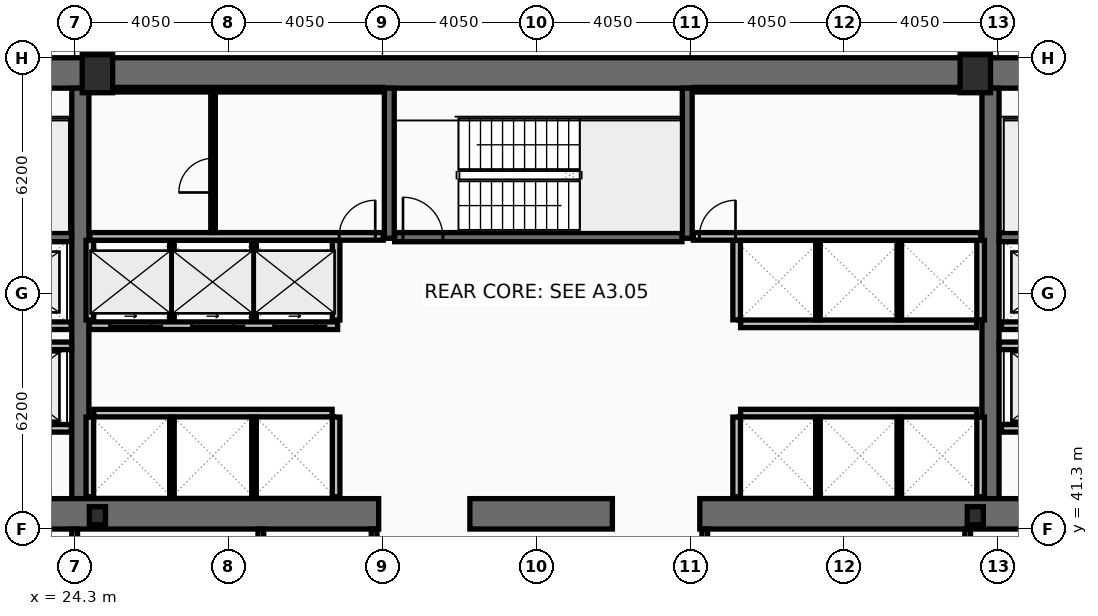
"""IFC4 building model, lengths in metres.
Left out: names, types, materials, properties, quantities, classifications, styles, units other than length and angle.
Written with IfcOpenShell. Run it as: python <this file> out.ifc"""

import sys

from ifc_helpers import new_model, si_unit, direction, frame, frame_2d, origin, origin_2d, place, context, subcontext, project, spatial, rectangle, hollow_rectangle, i_section, extrude, element, fill, save


model = new_model("IFC4")
c1 = context("Model", 3, precision=1e-05, world=origin(), true_north=direction((0.0, 1.0)))
c2 = subcontext(c1, "Body", "Model", "MODEL_VIEW")
j1 = project(units=[si_unit("LENGTHUNIT", "METRE"), si_unit("PLANEANGLEUNIT", "RADIAN")], contexts=[c1])
p1 = place(None, origin())
s1 = spatial("IfcSite", under=j1, at=p1, CompositionType="ELEMENT")
p2 = place(p1, origin())
s2 = spatial("IfcBuilding", under=s1, at=p2, CompositionType="ELEMENT")
p3 = place(p2, frame((0.0, 0.0, 65.8)))
s3 = spatial("IfcBuildingStorey", under=s2, at=p3, CompositionType="ELEMENT", Elevation=65.8)
p4 = place(p3, frame((16.2, 53.3, 0.0), z_axis=(0.0, 0.0, 1.0), x_axis=(1.0, 0.0, 0.0)))
e1 = element("IfcWall", 1, at=p4, inside=s3, PredefinedType="SHEAR", context=c2, shape_type="SweptSolid", body=[
    extrude(rectangle(XDim=40.5, YDim=0.8, at=frame_2d((20.25, 0.0))), origin(), (0.0, 0.0, 1.0), 3.82),
])
for number, where, z_axis, x_axis in (
    (2, (24.45, 42.1, 0.0), (0.0, 0.0, 1.0), (0.0, 1.0, 0.0)),
    (3, (48.4, 42.1, 0.0), (0.0, 0.0, 1.0), (0.0, 1.0, 0.0)),
):
    element("IfcWall", number, at=place(p3, frame(where, z_axis=z_axis, x_axis=x_axis)), inside=s3, PredefinedType="SHEAR", context=c2, shape_type="SweptSolid", body=[
        extrude(rectangle(XDim=10.8, YDim=0.45, at=frame_2d((5.4, 0.0))), origin(), (0.0, 0.0, 1.0), 3.82),
    ])
p5 = place(p3, frame((32.3, 41.7, 0.0), z_axis=(0.0, 0.0, 1.0), x_axis=(-1.0, 0.0, 0.0)))
e4 = element("IfcWall", 4, at=p5, inside=s3, PredefinedType="SHEAR", context=c2, shape_type="SweptSolid", body=[
    extrude(rectangle(XDim=11.45, YDim=0.8, at=frame_2d((5.725, 0.0))), origin(), (0.0, 0.0, 1.0), 3.82),
])
p6 = place(p3, frame((38.45, 41.7, 0.0), z_axis=(0.0, 0.0, 1.0), x_axis=(-1.0, 0.0, 0.0)))
e5 = element("IfcWall", 5, at=p6, inside=s3, PredefinedType="SHEAR", context=c2, shape_type="SweptSolid", body=[
    extrude(rectangle(XDim=3.75, YDim=0.8, at=frame_2d((1.875, 0.0))), origin(), (0.0, 0.0, 1.0), 3.82),
])
p7 = place(p3, frame((52.05, 41.7, 0.0), z_axis=(0.0, 0.0, 1.0), x_axis=(-1.0, 0.0, 0.0)))
e6 = element("IfcWall", 6, at=p7, inside=s3, PredefinedType="SHEAR", context=c2, shape_type="SweptSolid", body=[
    extrude(rectangle(XDim=11.3, YDim=0.8, at=frame_2d((5.65, 0.0))), origin(), (0.0, 0.0, 1.0), 3.82),
])
for number, where, z_axis, x_axis in (
    (7, (32.58, 48.95, 0.0), (0.0, 0.0, 1.0), (0.0, 1.0, 0.0)),
    (8, (40.42, 48.95, 0.0), (0.0, 0.0, 1.0), (0.0, 1.0, 0.0)),
):
    element("IfcWall", number, at=place(p3, frame(where, z_axis=z_axis, x_axis=x_axis)), inside=s3, PredefinedType="SHEAR", context=c2, shape_type="SweptSolid", body=[
        extrude(rectangle(XDim=3.95, YDim=0.26, at=frame_2d((1.975, 0.0))), origin(), (0.0, 0.0, 1.0), 3.82),
    ])
p8 = place(p3, frame((17.0, 48.98, 0.0), z_axis=(0.0, 0.0, 1.0), x_axis=(1.0, 0.0, 0.0)))
e9 = element("IfcWall", 9, at=p8, inside=s3, PredefinedType="SHEAR", context=c2, shape_type="SweptSolid", body=[
    extrude(rectangle(XDim=7.22, YDim=0.24, at=frame_2d((3.61, 0.0))), origin(), (0.0, 0.0, 1.0), 3.82),
])
p9 = place(p8, frame((0.22, 0.0, 0.0)))
e10 = element("IfcOpeningElement", 10, at=p9, cuts=e9, PredefinedType="OPENING", context=c2, shape_type="SweptSolid", body=[
    extrude(rectangle(XDim=1.05, YDim=2.15, at=frame_2d((0.525, 1.075))), frame((0.0, 0.13, 0.0), z_axis=(0.0, -1.0, 0.0), x_axis=(1.0, 0.0, 0.0)), (0.0, 0.0, 1.0), 0.26),
])
p10 = place(p3, frame((48.63, 48.98, 0.0), z_axis=(0.0, 0.0, 1.0), x_axis=(1.0, 0.0, 0.0)))
e11 = element("IfcWall", 11, at=p10, inside=s3, PredefinedType="SHEAR", context=c2, shape_type="SweptSolid", body=[
    extrude(rectangle(XDim=7.27, YDim=0.24, at=frame_2d((3.635, 0.0))), origin(), (0.0, 0.0, 1.0), 3.82),
])
p11 = place(p10, frame((6.0, 0.0, 0.0)))
e12 = element("IfcOpeningElement", 12, at=p11, cuts=e11, PredefinedType="OPENING", context=c2, shape_type="SweptSolid", body=[
    extrude(rectangle(XDim=1.05, YDim=2.15, at=frame_2d((0.525, 1.075))), frame((0.0, 0.13, 0.0), z_axis=(0.0, -1.0, 0.0), x_axis=(1.0, 0.0, 0.0)), (0.0, 0.0, 1.0), 0.26),
])
p12 = place(p3, frame((32.72, 48.98, 0.0), z_axis=(0.0, 0.0, 1.0), x_axis=(1.0, 0.0, 0.0)))
e13 = element("IfcWall", 13, at=p12, inside=s3, PredefinedType="SHEAR", context=c2, shape_type="SweptSolid", body=[
    extrude(rectangle(XDim=7.56, YDim=0.24, at=frame_2d((3.78, 0.0))), origin(), (0.0, 0.0, 1.0), 3.82),
])
p13 = place(p12, frame((0.22, 0.0, 0.0)))
e14 = element("IfcOpeningElement", 14, at=p13, cuts=e13, PredefinedType="OPENING", context=c2, shape_type="SweptSolid", body=[
    extrude(rectangle(XDim=1.05, YDim=2.15, at=frame_2d((0.525, 1.075))), frame((0.0, 0.13, 0.0), z_axis=(0.0, -1.0, 0.0), x_axis=(1.0, 0.0, 0.0)), (0.0, 0.0, 1.0), 0.26),
])
for number, where, z_axis, x_axis in (
    (15, (24.9, 53.28, 0.0), (0.0, 0.0, 1.0), (1.0, 0.0, 0.0)),
    (16, (48.0, 53.28, 0.0), (0.0, 0.0, 1.0), (1.0, 0.0, 0.0)),
):
    element("IfcColumn", number, at=place(p3, frame(where, z_axis=z_axis, x_axis=x_axis)), inside=s3, PredefinedType="COLUMN", context=c2, shape_type="SweptSolid", body=[
        extrude(hollow_rectangle(XDim=0.8, YDim=1.0, WallThickness=0.055, at=origin_2d()), origin(), (0.0, 0.0, 1.0), 4.0),
    ])
for number, where, z_axis, x_axis in (
    (17, (24.9, 41.65, 0.0), (0.0, 0.0, 1.0), (1.0, 0.0, 0.0)),
    (18, (48.0, 41.65, 0.0), (0.0, 0.0, 1.0), (1.0, 0.0, 0.0)),
):
    element("IfcColumn", number, at=place(p3, frame(where, z_axis=z_axis, x_axis=x_axis)), inside=s3, PredefinedType="COLUMN", context=c2, shape_type="SweptSolid", body=[
        extrude(i_section(OverallWidth=0.424, OverallDepth=0.474, WebThickness=0.048, FlangeThickness=0.077, at=origin_2d()), origin(), (0.0, 0.0, 1.0), 4.0),
    ])
p14 = place(p3, frame((51.61, 43.95, 0.0), z_axis=(0.0, 0.0, 1.0), x_axis=(-1.0, 0.0, 0.0)))
e19 = element("IfcWall", 19, at=p14, inside=s3, PredefinedType="PARTITIONING", context=c2, shape_type="SweptSolid", body=[
    extrude(rectangle(XDim=2.92, YDim=0.2, at=frame_2d((1.46, 0.0))), origin(), (0.0, 0.0, 1.0), 3.82),
])
p15 = place(p14, frame((0.81, 0.0, 0.0)))
e20 = element("IfcOpeningElement", 20, at=p15, cuts=e19, PredefinedType="OPENING", context=c2, shape_type="SweptSolid", body=[
    extrude(rectangle(XDim=1.3, YDim=2.18, at=frame_2d((0.65, 1.09))), frame((0.0, 0.11, 0.0), z_axis=(0.0, -1.0, 0.0), x_axis=(1.0, 0.0, 0.0)), (0.0, 0.0, 1.0), 0.22),
])
p16 = place(p3, frame((24.21, 43.95, 0.0), z_axis=(0.0, 0.0, 1.0), x_axis=(-1.0, 0.0, 0.0)))
e21 = element("IfcWall", 21, at=p16, inside=s3, PredefinedType="PARTITIONING", context=c2, shape_type="SweptSolid", body=[
    extrude(rectangle(XDim=2.97, YDim=0.2, at=frame_2d((1.485, 0.0))), origin(), (0.0, 0.0, 1.0), 3.82),
])
p17 = place(p16, frame((0.86, 0.0, 0.0)))
e22 = element("IfcOpeningElement", 22, at=p17, cuts=e21, PredefinedType="OPENING", context=c2, shape_type="SweptSolid", body=[
    extrude(rectangle(XDim=1.3, YDim=2.18, at=frame_2d((0.65, 1.09))), frame((0.0, 0.11, 0.0), z_axis=(0.0, -1.0, 0.0), x_axis=(1.0, 0.0, 0.0)), (0.0, 0.0, 1.0), 0.22),
])
p18 = place(p3, frame((51.61, 46.65, 0.0), z_axis=(0.0, 0.0, 1.0), x_axis=(-1.0, 0.0, 0.0)))
e23 = element("IfcWall", 23, at=p18, inside=s3, PredefinedType="PARTITIONING", context=c2, shape_type="SweptSolid", body=[
    extrude(rectangle(XDim=2.92, YDim=0.2, at=frame_2d((1.46, 0.0))), origin(), (0.0, 0.0, 1.0), 3.82),
])
p19 = place(p18, frame((0.86, 0.0, 0.0)))
e24 = element("IfcOpeningElement", 24, at=p19, cuts=e23, PredefinedType="OPENING", context=c2, shape_type="SweptSolid", body=[
    extrude(rectangle(XDim=1.2, YDim=2.18, at=frame_2d((0.6, 1.09))), frame((0.0, 0.11, 0.0), z_axis=(0.0, -1.0, 0.0), x_axis=(1.0, 0.0, 0.0)), (0.0, 0.0, 1.0), 0.22),
])
p20 = place(p3, frame((24.21, 46.65, 0.0), z_axis=(0.0, 0.0, 1.0), x_axis=(-1.0, 0.0, 0.0)))
e25 = element("IfcWall", 25, at=p20, inside=s3, PredefinedType="PARTITIONING", context=c2, shape_type="SweptSolid", body=[
    extrude(rectangle(XDim=2.97, YDim=0.2, at=frame_2d((1.485, 0.0))), origin(), (0.0, 0.0, 1.0), 3.82),
])
p21 = place(p20, frame((0.91, 0.0, 0.0)))
e26 = element("IfcOpeningElement", 26, at=p21, cuts=e25, PredefinedType="OPENING", context=c2, shape_type="SweptSolid", body=[
    extrude(rectangle(XDim=1.2, YDim=2.18, at=frame_2d((0.6, 1.09))), frame((0.0, 0.11, 0.0), z_axis=(0.0, -1.0, 0.0), x_axis=(1.0, 0.0, 0.0)), (0.0, 0.0, 1.0), 0.22),
])
p22 = place(p3, frame((31.22, 46.65, 0.0), z_axis=(0.0, 0.0, 1.0), x_axis=(-1.0, 0.0, 0.0)))
e27 = element("IfcWall", 27, at=p22, inside=s3, PredefinedType="PARTITIONING", context=c2, shape_type="SweptSolid", body=[
    extrude(rectangle(XDim=6.53, YDim=0.2, at=frame_2d((3.265, 0.0))), origin(), (0.0, 0.0, 1.0), 3.82),
])
p23 = place(p22, frame((4.9, 0.0, 0.0)))
e28 = element("IfcOpeningElement", 28, at=p23, cuts=e27, PredefinedType="OPENING", context=c2, shape_type="SweptSolid", body=[
    extrude(rectangle(XDim=1.1, YDim=2.18, at=frame_2d((0.55, 1.09))), frame((0.0, 0.11, 0.0), z_axis=(0.0, -1.0, 0.0), x_axis=(1.0, 0.0, 0.0)), (0.0, 0.0, 1.0), 0.22),
])
p24 = place(p22, frame((2.74, 0.0, 0.0)))
e29 = element("IfcOpeningElement", 29, at=p24, cuts=e27, PredefinedType="OPENING", context=c2, shape_type="SweptSolid", body=[
    extrude(rectangle(XDim=1.1, YDim=2.18, at=frame_2d((0.55, 1.09))), frame((0.0, 0.11, 0.0), z_axis=(0.0, -1.0, 0.0), x_axis=(1.0, 0.0, 0.0)), (0.0, 0.0, 1.0), 0.22),
])
p25 = place(p22, frame((0.58, 0.0, 0.0)))
e30 = element("IfcOpeningElement", 30, at=p25, cuts=e27, PredefinedType="OPENING", context=c2, shape_type="SweptSolid", body=[
    extrude(rectangle(XDim=1.1, YDim=2.18, at=frame_2d((0.55, 1.09))), frame((0.0, 0.11, 0.0), z_axis=(0.0, -1.0, 0.0), x_axis=(1.0, 0.0, 0.0)), (0.0, 0.0, 1.0), 0.22),
])
p26 = place(p3, frame((21.2, 46.12, 0.0), z_axis=(0.0, 0.0, 1.0), x_axis=(1.0, 0.0, 0.0)))
e31 = element("IfcWall", 31, at=p26, inside=s3, PredefinedType="PARTITIONING", context=c2, shape_type="SweptSolid", body=[
    extrude(rectangle(XDim=3.02, YDim=0.2, at=frame_2d((1.51, 0.0))), origin(), (0.0, 0.0, 1.0), 3.82),
])
p27 = place(p3, frame((48.63, 46.12, 0.0), z_axis=(0.0, 0.0, 1.0), x_axis=(1.0, 0.0, 0.0)))
e32 = element("IfcWall", 32, at=p27, inside=s3, PredefinedType="PARTITIONING", context=c2, shape_type="SweptSolid", body=[
    extrude(rectangle(XDim=3.07, YDim=0.2, at=frame_2d((1.535, 0.0))), origin(), (0.0, 0.0, 1.0), 3.82),
])
for number, where, z_axis, x_axis in (
    (33, (24.7, 46.8, 0.0), (0.0, 0.0, 1.0), (0.0, 1.0, 0.0)),
    (34, (31.18, 46.8, 0.0), (0.0, 0.0, 1.0), (0.0, 1.0, 0.0)),
):
    element("IfcWall", number, at=place(p3, frame(where, z_axis=z_axis, x_axis=x_axis)), inside=s3, PredefinedType="PARTITIONING", context=c2, shape_type="SweptSolid", body=[
        extrude(rectangle(XDim=2.095, YDim=0.2, at=frame_2d((1.047, 0.0))), origin(), (0.0, 0.0, 1.0), 3.82),
    ])
for number, where, z_axis, x_axis in (
    (35, (26.86, 46.8, 0.0), (0.0, 0.0, 1.0), (0.0, 1.0, 0.0)),
    (36, (29.02, 46.8, 0.0), (0.0, 0.0, 1.0), (0.0, 1.0, 0.0)),
):
    element("IfcWall", number, at=place(p3, frame(where, z_axis=z_axis, x_axis=x_axis)), inside=s3, PredefinedType="PARTITIONING", context=c2, shape_type="SweptSolid", body=[
        extrude(rectangle(XDim=2.095, YDim=0.12, at=frame_2d((1.047, 0.0))), origin(), (0.0, 0.0, 1.0), 3.82),
    ])
p28 = place(p3, frame((24.805, 44.35, 0.0), z_axis=(0.0, 0.0, 1.0), x_axis=(1.0, 0.0, 0.0)))
e37 = element("IfcWall", 37, at=p28, inside=s3, PredefinedType="PARTITIONING", context=c2, shape_type="SweptSolid", body=[
    extrude(rectangle(XDim=6.27, YDim=0.2, at=frame_2d((3.135, 0.0))), origin(), (0.0, 0.0, 1.0), 3.82),
])
for number, where, z_axis, x_axis in (
    (38, (24.7, 42.15, 0.0), (0.0, 0.0, 1.0), (0.0, 1.0, 0.0)),
    (39, (31.18, 42.15, 0.0), (0.0, 0.0, 1.0), (0.0, 1.0, 0.0)),
):
    element("IfcWall", number, at=place(p3, frame(where, z_axis=z_axis, x_axis=x_axis)), inside=s3, PredefinedType="PARTITIONING", context=c2, shape_type="SweptSolid", body=[
        extrude(rectangle(XDim=2.095, YDim=0.2, at=frame_2d((1.048, 0.0))), origin(), (0.0, 0.0, 1.0), 3.82),
    ])
for number, where, z_axis, x_axis in (
    (40, (26.86, 42.15, 0.0), (0.0, 0.0, 1.0), (0.0, 1.0, 0.0)),
    (41, (29.02, 42.15, 0.0), (0.0, 0.0, 1.0), (0.0, 1.0, 0.0)),
):
    element("IfcWall", number, at=place(p3, frame(where, z_axis=z_axis, x_axis=x_axis)), inside=s3, PredefinedType="PARTITIONING", context=c2, shape_type="SweptSolid", body=[
        extrude(rectangle(XDim=2.095, YDim=0.12, at=frame_2d((1.048, 0.0))), origin(), (0.0, 0.0, 1.0), 3.82),
    ])
p29 = place(p3, frame((41.825, 46.7, 0.0), z_axis=(0.0, 0.0, 1.0), x_axis=(1.0, 0.0, 0.0)))
e42 = element("IfcWall", 42, at=p29, inside=s3, PredefinedType="PARTITIONING", context=c2, shape_type="SweptSolid", body=[
    extrude(rectangle(XDim=6.21, YDim=0.2, at=frame_2d((3.105, 0.0))), origin(), (0.0, 0.0, 1.0), 3.82),
])
for number, where, z_axis, x_axis in (
    (43, (41.72, 46.805, 0.0), (0.0, 0.0, 1.0), (0.0, 1.0, 0.0)),
    (44, (48.14, 46.805, 0.0), (0.0, 0.0, 1.0), (0.0, 1.0, 0.0)),
):
    element("IfcWall", number, at=place(p3, frame(where, z_axis=z_axis, x_axis=x_axis)), inside=s3, PredefinedType="PARTITIONING", context=c2, shape_type="SweptSolid", body=[
        extrude(rectangle(XDim=2.09, YDim=0.2, at=frame_2d((1.045, 0.0))), origin(), (0.0, 0.0, 1.0), 3.82),
    ])
for number, where, z_axis, x_axis in (
    (45, (43.86, 46.805, 0.0), (0.0, 0.0, 1.0), (0.0, 1.0, 0.0)),
    (46, (46.0, 46.805, 0.0), (0.0, 0.0, 1.0), (0.0, 1.0, 0.0)),
):
    element("IfcWall", number, at=place(p3, frame(where, z_axis=z_axis, x_axis=x_axis)), inside=s3, PredefinedType="PARTITIONING", context=c2, shape_type="SweptSolid", body=[
        extrude(rectangle(XDim=2.09, YDim=0.12, at=frame_2d((1.045, 0.0))), origin(), (0.0, 0.0, 1.0), 3.82),
    ])
p30 = place(p3, frame((41.825, 44.35, 0.0), z_axis=(0.0, 0.0, 1.0), x_axis=(1.0, 0.0, 0.0)))
e47 = element("IfcWall", 47, at=p30, inside=s3, PredefinedType="PARTITIONING", context=c2, shape_type="SweptSolid", body=[
    extrude(rectangle(XDim=6.21, YDim=0.2, at=frame_2d((3.105, 0.0))), origin(), (0.0, 0.0, 1.0), 3.82),
])
for number, where, z_axis, x_axis in (
    (48, (41.72, 42.15, 0.0), (0.0, 0.0, 1.0), (0.0, 1.0, 0.0)),
    (49, (48.14, 42.15, 0.0), (0.0, 0.0, 1.0), (0.0, 1.0, 0.0)),
):
    element("IfcWall", number, at=place(p3, frame(where, z_axis=z_axis, x_axis=x_axis)), inside=s3, PredefinedType="PARTITIONING", context=c2, shape_type="SweptSolid", body=[
        extrude(rectangle(XDim=2.095, YDim=0.2, at=frame_2d((1.048, 0.0))), origin(), (0.0, 0.0, 1.0), 3.82),
    ])
for number, where, z_axis, x_axis in (
    (50, (43.86, 42.15, 0.0), (0.0, 0.0, 1.0), (0.0, 1.0, 0.0)),
    (51, (46.0, 42.15, 0.0), (0.0, 0.0, 1.0), (0.0, 1.0, 0.0)),
):
    element("IfcWall", number, at=place(p3, frame(where, z_axis=z_axis, x_axis=x_axis)), inside=s3, PredefinedType="PARTITIONING", context=c2, shape_type="SweptSolid", body=[
        extrude(rectangle(XDim=2.095, YDim=0.12, at=frame_2d((1.048, 0.0))), origin(), (0.0, 0.0, 1.0), 3.82),
    ])
p31 = place(p3, frame((24.7, 52.86, 0.0), z_axis=(0.0, 0.0, 1.0), x_axis=(1.0, 0.0, 0.0)))
e52 = element("IfcWall", 52, at=p31, inside=s3, PredefinedType="PARTITIONING", context=c2, shape_type="SweptSolid", body=[
    extrude(rectangle(XDim=7.72, YDim=0.12, at=frame_2d((3.86, 0.0))), origin(), (0.0, 0.0, 1.0), 3.82),
])
p32 = place(p3, frame((24.7, 49.0, 0.0), z_axis=(0.0, 0.0, 1.0), x_axis=(1.0, 0.0, 0.0)))
e53 = element("IfcWall", 53, at=p32, inside=s3, PredefinedType="PARTITIONING", context=c2, shape_type="SweptSolid", body=[
    extrude(rectangle(XDim=7.72, YDim=0.2, at=frame_2d((3.86, 0.0))), origin(), (0.0, 0.0, 1.0), 3.82),
])
p33 = place(p32, frame((6.56, 0.0, 0.0)))
e54 = element("IfcOpeningElement", 54, at=p33, cuts=e53, PredefinedType="OPENING", context=c2, shape_type="SweptSolid", body=[
    extrude(rectangle(XDim=0.95, YDim=2.1, at=frame_2d((0.475, 1.05))), frame((0.0, 0.11, 0.0), z_axis=(0.0, -1.0, 0.0), x_axis=(1.0, 0.0, 0.0)), (0.0, 0.0, 1.0), 0.22),
])
p34 = place(p3, frame((27.942, 49.105, 0.0), z_axis=(0.0, 0.0, 1.0), x_axis=(0.0, 1.0, 0.0)))
e55 = element("IfcWall", 55, at=p34, inside=s3, PredefinedType="PARTITIONING", context=c2, shape_type="SweptSolid", body=[
    extrude(rectangle(XDim=3.69, YDim=0.12, at=frame_2d((1.845, 0.0))), origin(), (0.0, 0.0, 1.0), 3.82),
])
p35 = place(p34, frame((1.05, 0.0, 0.0)))
e56 = element("IfcOpeningElement", 56, at=p35, cuts=e55, PredefinedType="OPENING", context=c2, shape_type="SweptSolid", body=[
    extrude(rectangle(XDim=0.9, YDim=2.05, at=frame_2d((0.45, 1.025))), frame((0.0, 0.07, 0.0), z_axis=(0.0, -1.0, 0.0), x_axis=(1.0, 0.0, 0.0)), (0.0, 0.0, 1.0), 0.14),
])
p36 = place(p3, frame((40.58, 52.86, 0.0), z_axis=(0.0, 0.0, 1.0), x_axis=(1.0, 0.0, 0.0)))
e57 = element("IfcWall", 57, at=p36, inside=s3, PredefinedType="PARTITIONING", context=c2, shape_type="SweptSolid", body=[
    extrude(rectangle(XDim=7.56, YDim=0.12, at=frame_2d((3.78, 0.0))), origin(), (0.0, 0.0, 1.0), 3.82),
])
p37 = place(p3, frame((40.58, 49.0, 0.0), z_axis=(0.0, 0.0, 1.0), x_axis=(1.0, 0.0, 0.0)))
e58 = element("IfcWall", 58, at=p37, inside=s3, PredefinedType="PARTITIONING", context=c2, shape_type="SweptSolid", body=[
    extrude(rectangle(XDim=7.56, YDim=0.2, at=frame_2d((3.78, 0.0))), origin(), (0.0, 0.0, 1.0), 3.82),
])
p38 = place(p37, frame((0.16, 0.0, 0.0)))
e59 = element("IfcOpeningElement", 59, at=p38, cuts=e58, PredefinedType="OPENING", context=c2, shape_type="SweptSolid", body=[
    extrude(rectangle(XDim=0.95, YDim=2.1, at=frame_2d((0.475, 1.05))), frame((0.0, 0.11, 0.0), z_axis=(0.0, -1.0, 0.0), x_axis=(1.0, 0.0, 0.0)), (0.0, 0.0, 1.0), 0.22),
])
for number, where, z_axis, x_axis in (
    (60, (24.3, 38.28, 0.0), (0.0, 0.0, 1.0), (0.0, 1.0, 0.0)),
    (61, (29.2, 38.28, 0.0), (0.0, 0.0, 1.0), (0.0, 1.0, 0.0)),
    (62, (32.18, 38.28, 0.0), (0.0, 0.0, 1.0), (0.0, 1.0, 0.0)),
    (63, (40.88, 38.28, 0.0), (0.0, 0.0, 1.0), (0.0, 1.0, 0.0)),
):
    element("IfcWall", number, at=place(p3, frame(where, z_axis=z_axis, x_axis=x_axis)), inside=s3, PredefinedType="PARTITIONING", context=c2, shape_type="SweptSolid", body=[
        extrude(rectangle(XDim=3.02, YDim=0.15, at=frame_2d((1.51, 0.0))), origin(), (0.0, 0.0, 1.0), 3.82),
    ])
p39 = place(p3, frame((47.8, 38.28, 0.0), z_axis=(0.0, 0.0, 1.0), x_axis=(0.0, 1.0, 0.0)))
e64 = element("IfcWall", 64, at=p39, inside=s3, PredefinedType="PARTITIONING", context=c2, shape_type="SweptSolid", body=[
    extrude(rectangle(XDim=3.02, YDim=0.15, at=frame_2d((1.51, 0.0))), origin(), (0.0, 0.0, 1.0), 3.01),
])
p40 = place(p13, origin())
e65 = element("IfcDoor", 65, at=p40, inside=s3, OperationType="SINGLE_SWING_LEFT", PredefinedType="DOOR", context=c2, shape_type="SweptSolid", body=[
    extrude(rectangle(XDim=1.05, YDim=2.15, at=frame_2d((0.525, 1.075))), frame((0.0, 0.025, 0.0), z_axis=(0.0, -1.0, 0.0), x_axis=(1.0, 0.0, 0.0)), (0.0, 0.0, 1.0), 0.05),
])
fill(e14, e65)
p41 = place(p23, origin())
e66 = element("IfcDoor", 66, at=p41, inside=s3, OperationType="SLIDING_TO_LEFT", PredefinedType="DOOR", context=c2, shape_type="SweptSolid", body=[
    extrude(rectangle(XDim=1.1, YDim=2.18, at=frame_2d((0.55, 1.09))), frame((0.0, 0.025, 0.0), z_axis=(0.0, -1.0, 0.0), x_axis=(1.0, 0.0, 0.0)), (0.0, 0.0, 1.0), 0.05),
])
fill(e28, e66)
p42 = place(p24, origin())
e67 = element("IfcDoor", 67, at=p42, inside=s3, OperationType="SLIDING_TO_LEFT", PredefinedType="DOOR", context=c2, shape_type="SweptSolid", body=[
    extrude(rectangle(XDim=1.1, YDim=2.18, at=frame_2d((0.55, 1.09))), frame((0.0, 0.025, 0.0), z_axis=(0.0, -1.0, 0.0), x_axis=(1.0, 0.0, 0.0)), (0.0, 0.0, 1.0), 0.05),
])
fill(e29, e67)
p43 = place(p25, origin())
e68 = element("IfcDoor", 68, at=p43, inside=s3, OperationType="SLIDING_TO_LEFT", PredefinedType="DOOR", context=c2, shape_type="SweptSolid", body=[
    extrude(rectangle(XDim=1.1, YDim=2.18, at=frame_2d((0.55, 1.09))), frame((0.0, 0.025, 0.0), z_axis=(0.0, -1.0, 0.0), x_axis=(1.0, 0.0, 0.0)), (0.0, 0.0, 1.0), 0.05),
])
fill(e30, e68)
p44 = place(p33, origin())
e69 = element("IfcDoor", 69, at=p44, inside=s3, OperationType="SINGLE_SWING_RIGHT", PredefinedType="DOOR", context=c2, shape_type="SweptSolid", body=[
    extrude(rectangle(XDim=0.95, YDim=2.1, at=frame_2d((0.475, 1.05))), frame((0.0, 0.025, 0.0), z_axis=(0.0, -1.0, 0.0), x_axis=(1.0, 0.0, 0.0)), (0.0, 0.0, 1.0), 0.05),
])
fill(e54, e69)
p45 = place(p35, origin())
e70 = element("IfcDoor", 70, at=p45, inside=s3, OperationType="SINGLE_SWING_LEFT", PredefinedType="DOOR", context=c2, shape_type="SweptSolid", body=[
    extrude(rectangle(XDim=0.9, YDim=2.05, at=frame_2d((0.45, 1.025))), frame((0.0, 0.025, 0.0), z_axis=(0.0, -1.0, 0.0), x_axis=(1.0, 0.0, 0.0)), (0.0, 0.0, 1.0), 0.05),
])
fill(e56, e70)
p46 = place(p38, origin())
e71 = element("IfcDoor", 71, at=p46, inside=s3, OperationType="SINGLE_SWING_RIGHT", PredefinedType="DOOR", context=c2, shape_type="SweptSolid", body=[
    extrude(rectangle(XDim=0.95, YDim=2.1, at=frame_2d((0.475, 1.05))), frame((0.0, 0.025, 0.0), z_axis=(0.0, -1.0, 0.0), x_axis=(1.0, 0.0, 0.0)), (0.0, 0.0, 1.0), 0.05),
])
fill(e59, e71)
save(model, sys.argv[1])
